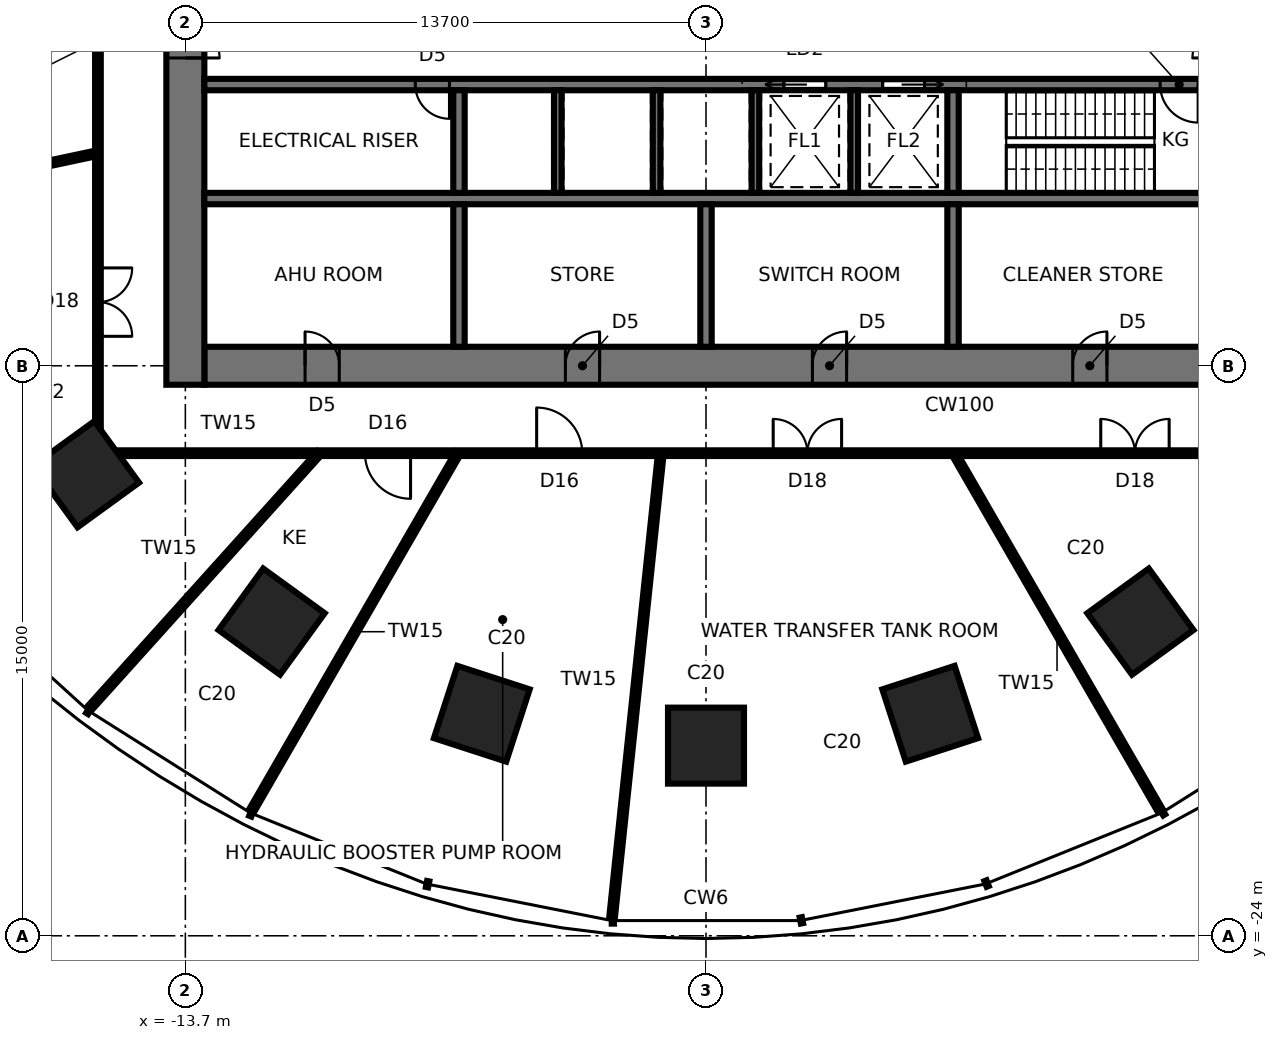
"""IFC4 building model, lengths in metres.
Left out: names, types, materials, properties, quantities, classifications, styles, units other than length and angle.
Written with IfcOpenShell. Run it as: python <this file> out.ifc"""

import sys

from ifc_helpers import new_model, si_unit, direction, frame, frame_2d, origin, origin_2d, place, context, subcontext, project, spatial, rectangle, extrude, element, fill, save


model = new_model("IFC4")
c1 = context("Model", 3, precision=1e-05, world=origin(), true_north=direction((0.0, 1.0)))
c2 = subcontext(c1, "Body", "Model", "MODEL_VIEW")
j1 = project(units=[si_unit("LENGTHUNIT", "METRE"), si_unit("PLANEANGLEUNIT", "RADIAN")], contexts=[c1])
p1 = place(None, origin())
s1 = spatial("IfcSite", under=j1, at=p1, CompositionType="ELEMENT")
p2 = place(p1, origin())
s2 = spatial("IfcBuilding", under=s1, at=p2, CompositionType="ELEMENT")
p3 = place(p2, frame((0.0, 0.0, 86.8)))
s3 = spatial("IfcBuildingStorey", under=s2, at=p3, CompositionType="ELEMENT", Elevation=86.8)
for number, where, z_axis, x_axis in (
    (1, (-16.315, -11.854, 0.0), (0.0, 0.0, 1.0), (-0.809, -0.588, 0.0)),
    (2, (-11.43, -15.733, 0.0), (0.0, 0.0, 1.0), (-0.588, -0.809, 0.0)),
    (3, (-5.9, -18.157, 0.0), (0.0, 0.0, 1.0), (-0.309, -0.951, 0.0)),
    (4, (0.0, -18.996, 0.0), (0.0, 0.0, 1.0), (0.0, -1.0, 0.0)),
    (5, (5.9, -18.157, 0.0), (0.0, 0.0, 1.0), (0.309, -0.951, 0.0)),
    (6, (11.43, -15.733, 0.0), (0.0, 0.0, 1.0), (0.588, -0.809, 0.0)),
):
    element("IfcColumn", number, at=place(p3, frame(where, z_axis=z_axis, x_axis=x_axis)), inside=s3, PredefinedType="COLUMN", context=c2, shape_type="SweptSolid", body=[
        extrude(rectangle(XDim=2.0, YDim=2.0, at=origin_2d()), origin(), (0.0, 0.0, 1.0), 5.6),
    ])
p4 = place(p3, frame((-13.2, -9.0, 0.0), z_axis=(0.0, 0.0, 1.0), x_axis=(1.0, 0.0, 0.0)))
e7 = element("IfcWall", 7, at=p4, inside=s3, PredefinedType="SHEAR", context=c2, shape_type="SweptSolid", body=[
    extrude(rectangle(XDim=26.4, YDim=1.0, at=frame_2d((13.2, 0.0))), origin(), (0.0, 0.0, 1.0), 5.6),
])
p5 = place(p4, frame((2.65, 0.0, 0.0)))
e8 = element("IfcOpeningElement", 8, at=p5, cuts=e7, PredefinedType="OPENING", context=c2, shape_type="SweptSolid", body=[
    extrude(rectangle(XDim=0.9, YDim=2.1, at=frame_2d((0.45, 1.05))), frame((0.0, 0.51, 0.0), z_axis=(0.0, -1.0, 0.0), x_axis=(1.0, 0.0, 0.0)), (0.0, 0.0, 1.0), 1.02),
])
p6 = place(p4, frame((9.5, 0.0, 0.0)))
e9 = element("IfcOpeningElement", 9, at=p6, cuts=e7, PredefinedType="OPENING", context=c2, shape_type="SweptSolid", body=[
    extrude(rectangle(XDim=0.9, YDim=2.1, at=frame_2d((0.45, 1.05))), frame((0.0, 0.51, 0.0), z_axis=(0.0, -1.0, 0.0), x_axis=(1.0, 0.0, 0.0)), (0.0, 0.0, 1.0), 1.02),
])
p7 = place(p4, frame((16.0, 0.0, 0.0)))
e10 = element("IfcOpeningElement", 10, at=p7, cuts=e7, PredefinedType="OPENING", context=c2, shape_type="SweptSolid", body=[
    extrude(rectangle(XDim=0.9, YDim=2.1, at=frame_2d((0.45, 1.05))), frame((0.0, 0.51, 0.0), z_axis=(0.0, -1.0, 0.0), x_axis=(1.0, 0.0, 0.0)), (0.0, 0.0, 1.0), 1.02),
])
p8 = place(p4, frame((22.85, 0.0, 0.0)))
e11 = element("IfcOpeningElement", 11, at=p8, cuts=e7, PredefinedType="OPENING", context=c2, shape_type="SweptSolid", body=[
    extrude(rectangle(XDim=0.9, YDim=2.1, at=frame_2d((0.45, 1.05))), frame((0.0, 0.51, 0.0), z_axis=(0.0, -1.0, 0.0), x_axis=(1.0, 0.0, 0.0)), (0.0, 0.0, 1.0), 1.02),
])
p9 = place(p3, frame((-13.7, 9.5, 0.0), z_axis=(0.0, 0.0, 1.0), x_axis=(0.0, -1.0, 0.0)))
e12 = element("IfcWall", 12, at=p9, inside=s3, PredefinedType="SHEAR", context=c2, shape_type="SweptSolid", body=[
    extrude(rectangle(XDim=19.0, YDim=1.0, at=frame_2d((9.5, 0.0))), origin(), (0.0, 0.0, 1.0), 5.6),
])
p10 = place(p9, frame((8.6, 0.0, 0.0)))
e13 = element("IfcOpeningElement", 13, at=p10, cuts=e12, PredefinedType="OPENING", context=c2, shape_type="SweptSolid", body=[
    extrude(rectangle(XDim=1.8, YDim=2.4, at=frame_2d((0.9, 1.2))), frame((0.0, 0.51, 0.0), z_axis=(0.0, -1.0, 0.0), x_axis=(1.0, 0.0, 0.0)), (0.0, 0.0, 1.0), 1.02),
])
p11 = place(p3, frame((-13.2, -1.6, 0.0), z_axis=(0.0, 0.0, 1.0), x_axis=(1.0, 0.0, 0.0)))
e14 = element("IfcWall", 14, at=p11, inside=s3, PredefinedType="SHEAR", context=c2, shape_type="SweptSolid", body=[
    extrude(rectangle(XDim=26.4, YDim=0.3, at=frame_2d((13.2, 0.0))), origin(), (0.0, 0.0, 1.0), 5.6),
])
p12 = place(p11, frame((25.15, 0.0, 0.0)))
e15 = element("IfcOpeningElement", 15, at=p12, cuts=e14, PredefinedType="OPENING", context=c2, shape_type="SweptSolid", body=[
    extrude(rectangle(XDim=1.0, YDim=2.1, at=frame_2d((0.5, 1.05))), frame((0.0, 0.16, 0.0), z_axis=(0.0, -1.0, 0.0), x_axis=(1.0, 0.0, 0.0)), (0.0, 0.0, 1.0), 0.32),
])
p13 = place(p11, frame((15.25, 0.0, 0.0)))
e16 = element("IfcOpeningElement", 16, at=p13, cuts=e14, PredefinedType="OPENING", context=c2, shape_type="SweptSolid", body=[
    extrude(rectangle(XDim=1.1, YDim=2.3, at=frame_2d((0.55, 1.15))), frame((0.0, 0.16, 0.0), z_axis=(0.0, -1.0, 0.0), x_axis=(1.0, 0.0, 0.0)), (0.0, 0.0, 1.0), 0.32),
])
p14 = place(p11, frame((17.85, 0.0, 0.0)))
e17 = element("IfcOpeningElement", 17, at=p14, cuts=e14, PredefinedType="OPENING", context=c2, shape_type="SweptSolid", body=[
    extrude(rectangle(XDim=1.1, YDim=2.3, at=frame_2d((0.55, 1.15))), frame((0.0, 0.16, 0.0), z_axis=(0.0, -1.0, 0.0), x_axis=(1.0, 0.0, 0.0)), (0.0, 0.0, 1.0), 0.32),
])
p15 = place(p11, frame((5.55, 0.0, 0.0)))
e18 = element("IfcOpeningElement", 18, at=p15, cuts=e14, PredefinedType="OPENING", context=c2, shape_type="SweptSolid", body=[
    extrude(rectangle(XDim=0.9, YDim=2.1, at=frame_2d((0.45, 1.05))), frame((0.0, 0.16, 0.0), z_axis=(0.0, -1.0, 0.0), x_axis=(1.0, 0.0, 0.0)), (0.0, 0.0, 1.0), 0.32),
])
p16 = place(p3, frame((-13.2, -4.6, 0.0), z_axis=(0.0, 0.0, 1.0), x_axis=(1.0, 0.0, 0.0)))
e19 = element("IfcWall", 19, at=p16, inside=s3, PredefinedType="SHEAR", context=c2, shape_type="SweptSolid", body=[
    extrude(rectangle(XDim=26.4, YDim=0.3, at=frame_2d((13.2, 0.0))), origin(), (0.0, 0.0, 1.0), 5.6),
])
p17 = place(p3, frame((-6.5, -1.75, 0.0), z_axis=(0.0, 0.0, 1.0), x_axis=(0.0, -1.0, 0.0)))
e20 = element("IfcWall", 20, at=p17, inside=s3, PredefinedType="SHEAR", context=c2, shape_type="SweptSolid", body=[
    extrude(rectangle(XDim=2.7, YDim=0.3, at=frame_2d((1.35, 0.0))), origin(), (0.0, 0.0, 1.0), 5.6),
])
p18 = place(p3, frame((-6.5, -4.75, 0.0), z_axis=(0.0, 0.0, 1.0), x_axis=(0.0, -1.0, 0.0)))
e21 = element("IfcWall", 21, at=p18, inside=s3, PredefinedType="SHEAR", context=c2, shape_type="SweptSolid", body=[
    extrude(rectangle(XDim=3.75, YDim=0.3, at=frame_2d((1.875, 0.0))), origin(), (0.0, 0.0, 1.0), 5.6),
])
p19 = place(p3, frame((6.5, -1.75, 0.0), z_axis=(0.0, 0.0, 1.0), x_axis=(0.0, -1.0, 0.0)))
e22 = element("IfcWall", 22, at=p19, inside=s3, PredefinedType="SHEAR", context=c2, shape_type="SweptSolid", body=[
    extrude(rectangle(XDim=2.7, YDim=0.3, at=frame_2d((1.35, 0.0))), origin(), (0.0, 0.0, 1.0), 5.6),
])
p20 = place(p3, frame((6.5, -4.75, 0.0), z_axis=(0.0, 0.0, 1.0), x_axis=(0.0, -1.0, 0.0)))
e23 = element("IfcWall", 23, at=p20, inside=s3, PredefinedType="SHEAR", context=c2, shape_type="SweptSolid", body=[
    extrude(rectangle(XDim=3.75, YDim=0.3, at=frame_2d((1.875, 0.0))), origin(), (0.0, 0.0, 1.0), 5.6),
])
for number, where, z_axis, x_axis in (
    (24, (-3.9, -1.75, 0.0), (0.0, 0.0, 1.0), (0.0, -1.0, 0.0)),
    (25, (-1.3, -1.75, 0.0), (0.0, 0.0, 1.0), (0.0, -1.0, 0.0)),
    (26, (1.3, -1.75, 0.0), (0.0, 0.0, 1.0), (0.0, -1.0, 0.0)),
    (27, (3.9, -1.75, 0.0), (0.0, 0.0, 1.0), (0.0, -1.0, 0.0)),
):
    element("IfcWall", number, at=place(p3, frame(where, z_axis=z_axis, x_axis=x_axis)), inside=s3, PredefinedType="SHEAR", context=c2, shape_type="SweptSolid", body=[
        extrude(rectangle(XDim=2.7, YDim=0.2, at=frame_2d((1.35, 0.0))), origin(), (0.0, 0.0, 1.0), 5.6),
    ])
p21 = place(p3, frame((0.0, -4.75, 0.0), z_axis=(0.0, 0.0, 1.0), x_axis=(0.0, -1.0, 0.0)))
e28 = element("IfcWall", 28, at=p21, inside=s3, PredefinedType="SHEAR", context=c2, shape_type="SweptSolid", body=[
    extrude(rectangle(XDim=3.75, YDim=0.3, at=frame_2d((1.875, 0.0))), origin(), (0.0, 0.0, 1.0), 5.6),
])
p22 = place(p3, frame((-16.0, -3.401, 0.0), z_axis=(0.0, 0.0, 1.0), x_axis=(-0.978145186273, -0.207923049637, 0.0)))
e29 = element("IfcWall", 29, at=p22, inside=s3, PredefinedType="PARTITIONING", context=c2, shape_type="SweptSolid", body=[
    extrude(rectangle(XDim=9.719, YDim=0.15, at=frame_2d((4.859, 0.0))), origin(), (0.0, 0.0, 1.0), 5.4),
])
p23 = place(p3, frame((-10.175, -11.3, 0.0), z_axis=(0.0, 0.0, 1.0), x_axis=(-0.669136564673, -0.743139460544, 0.0)))
e30 = element("IfcWall", 30, at=p23, inside=s3, PredefinedType="PARTITIONING", context=c2, shape_type="SweptSolid", body=[
    extrude(rectangle(XDim=9.026, YDim=0.15, at=frame_2d((4.513, 0.0))), origin(), (0.0, 0.0, 1.0), 5.4),
])
p24 = place(p3, frame((-6.524, -11.3, 0.0), z_axis=(0.0, 0.0, 1.0), x_axis=(-0.499989292232, -0.866031585829, 0.0)))
e31 = element("IfcWall", 31, at=p24, inside=s3, PredefinedType="PARTITIONING", context=c2, shape_type="SweptSolid", body=[
    extrude(rectangle(XDim=10.85, YDim=0.15, at=frame_2d((5.425, 0.0))), origin(), (0.0, 0.0, 1.0), 5.4),
])
p25 = place(p3, frame((-1.188, -11.3, 0.0), z_axis=(0.0, 0.0, 1.0), x_axis=(-0.104528610728, -0.99452187987, 0.0)))
e32 = element("IfcWall", 32, at=p25, inside=s3, PredefinedType="PARTITIONING", context=c2, shape_type="SweptSolid", body=[
    extrude(rectangle(XDim=12.288, YDim=0.15, at=frame_2d((6.144, 0.0))), origin(), (0.0, 0.0, 1.0), 5.4),
])
p26 = place(p3, frame((-16.0, -11.3, 0.0), z_axis=(0.0, 0.0, 1.0), x_axis=(1.0, 0.0, 0.0)))
e33 = element("IfcWall", 33, at=p26, inside=s3, PredefinedType="PARTITIONING", context=c2, shape_type="SweptSolid", body=[
    extrude(rectangle(XDim=32.0, YDim=0.15, at=frame_2d((16.0, 0.0))), origin(), (0.0, 0.0, 1.0), 5.4),
])
p27 = place(p26, frame((7.026, 0.0, 0.0)))
e34 = element("IfcOpeningElement", 34, at=p27, cuts=e33, PredefinedType="OPENING", context=c2, shape_type="SweptSolid", body=[
    extrude(rectangle(XDim=1.2, YDim=2.1, at=frame_2d((0.6, 1.05))), frame((0.0, 0.085, 0.0), z_axis=(0.0, -1.0, 0.0), x_axis=(1.0, 0.0, 0.0)), (0.0, 0.0, 1.0), 0.17),
])
p28 = place(p26, frame((11.544, 0.0, 0.0)))
e35 = element("IfcOpeningElement", 35, at=p28, cuts=e33, PredefinedType="OPENING", context=c2, shape_type="SweptSolid", body=[
    extrude(rectangle(XDim=1.2, YDim=2.1, at=frame_2d((0.6, 1.05))), frame((0.0, 0.085, 0.0), z_axis=(0.0, -1.0, 0.0), x_axis=(1.0, 0.0, 0.0)), (0.0, 0.0, 1.0), 0.17),
])
p29 = place(p26, frame((17.768, 0.0, 0.0)))
e36 = element("IfcOpeningElement", 36, at=p29, cuts=e33, PredefinedType="OPENING", context=c2, shape_type="SweptSolid", body=[
    extrude(rectangle(XDim=1.8, YDim=2.4, at=frame_2d((0.9, 1.2))), frame((0.0, 0.085, 0.0), z_axis=(0.0, -1.0, 0.0), x_axis=(1.0, 0.0, 0.0)), (0.0, 0.0, 1.0), 0.17),
])
p30 = place(p26, frame((26.387, 0.0, 0.0)))
e37 = element("IfcOpeningElement", 37, at=p30, cuts=e33, PredefinedType="OPENING", context=c2, shape_type="SweptSolid", body=[
    extrude(rectangle(XDim=1.8, YDim=2.4, at=frame_2d((0.9, 1.2))), frame((0.0, 0.085, 0.0), z_axis=(0.0, -1.0, 0.0), x_axis=(1.0, 0.0, 0.0)), (0.0, 0.0, 1.0), 0.17),
])
p31 = place(p3, frame((6.524, -11.3, 0.0), z_axis=(0.0, 0.0, 1.0), x_axis=(0.499989292232, -0.866031585829, 0.0)))
e38 = element("IfcWall", 38, at=p31, inside=s3, PredefinedType="PARTITIONING", context=c2, shape_type="SweptSolid", body=[
    extrude(rectangle(XDim=10.85, YDim=0.15, at=frame_2d((5.425, 0.0))), origin(), (0.0, 0.0, 1.0), 5.4),
])
p32 = place(p3, frame((-16.0, 11.3, 0.0), z_axis=(0.0, 0.0, 1.0), x_axis=(0.0, -1.0, 0.0)))
e39 = element("IfcWall", 39, at=p32, inside=s3, PredefinedType="PARTITIONING", context=c2, shape_type="SweptSolid", body=[
    extrude(rectangle(XDim=22.6, YDim=0.15, at=frame_2d((11.3, 0.0))), origin(), (0.0, 0.0, 1.0), 5.4),
])
p33 = place(p32, frame((8.539, 0.0, 0.0)))
e40 = element("IfcOpeningElement", 40, at=p33, cuts=e39, PredefinedType="OPENING", context=c2, shape_type="SweptSolid", body=[
    extrude(rectangle(XDim=1.8, YDim=2.4, at=frame_2d((0.9, 1.2))), frame((0.0, 0.085, 0.0), z_axis=(0.0, -1.0, 0.0), x_axis=(1.0, 0.0, 0.0)), (0.0, 0.0, 1.0), 0.17),
])
p34 = place(p32, frame((17.725, 0.0, 0.0)))
e41 = element("IfcOpeningElement", 41, at=p34, cuts=e39, PredefinedType="OPENING", context=c2, shape_type="SweptSolid", body=[
    extrude(rectangle(XDim=1.8, YDim=2.4, at=frame_2d((0.9, 1.2))), frame((0.0, 0.085, 0.0), z_axis=(0.0, -1.0, 0.0), x_axis=(1.0, 0.0, 0.0)), (0.0, 0.0, 1.0), 0.17),
])
p35 = place(p10, origin())
e42 = element("IfcDoor", 42, at=p35, inside=s3, OperationType="DOUBLE_DOOR_SINGLE_SWING", PredefinedType="DOOR", context=c2, shape_type="SweptSolid", body=[
    extrude(rectangle(XDim=1.72, YDim=2.36, at=frame_2d((0.9, 1.18))), frame((0.0, 0.025, 0.0), z_axis=(0.0, -1.0, 0.0), x_axis=(1.0, 0.0, 0.0)), (0.0, 0.0, 1.0), 0.05),
    extrude(rectangle(XDim=0.04, YDim=2.4, at=frame_2d((0.02, 1.2))), frame((0.0, 0.25, 0.0), z_axis=(0.0, -1.0, 0.0), x_axis=(1.0, 0.0, 0.0)), (0.0, 0.0, 1.0), 0.5),
    extrude(rectangle(XDim=0.04, YDim=2.4, at=frame_2d((1.78, 1.2))), frame((0.0, 0.25, 0.0), z_axis=(0.0, -1.0, 0.0), x_axis=(1.0, 0.0, 0.0)), (0.0, 0.0, 1.0), 0.5),
    extrude(rectangle(XDim=1.72, YDim=0.04, at=frame_2d((0.9, 2.38))), frame((0.0, 0.25, 0.0), z_axis=(0.0, -1.0, 0.0), x_axis=(1.0, 0.0, 0.0)), (0.0, 0.0, 1.0), 0.5),
])
fill(e13, e42)
p36 = place(p12, frame((1.0, 0.0, 0.0), z_axis=(0.0, 0.0, 1.0), x_axis=(-1.0, 0.0, 0.0)))
e43 = element("IfcDoor", 43, at=p36, inside=s3, OperationType="SINGLE_SWING_LEFT", PredefinedType="DOOR", context=c2, shape_type="SweptSolid", body=[
    extrude(rectangle(XDim=1.0, YDim=2.1, at=frame_2d((0.5, 1.05))), frame((0.0, 0.025, 0.0), z_axis=(0.0, -1.0, 0.0), x_axis=(1.0, 0.0, 0.0)), (0.0, 0.0, 1.0), 0.05),
])
fill(e15, e43)
p37 = place(p13, frame((1.1, 0.0, 0.0), z_axis=(0.0, 0.0, 1.0), x_axis=(-1.0, 0.0, 0.0)))
e44 = element("IfcDoor", 44, at=p37, inside=s3, OperationType="SLIDING_TO_RIGHT", PredefinedType="DOOR", context=c2, shape_type="SweptSolid", body=[
    extrude(rectangle(XDim=1.1, YDim=2.3, at=frame_2d((0.55, 1.15))), frame((0.0, 0.025, 0.0), z_axis=(0.0, -1.0, 0.0), x_axis=(1.0, 0.0, 0.0)), (0.0, 0.0, 1.0), 0.05),
])
fill(e16, e44)
p38 = place(p14, frame((1.1, 0.0, 0.0), z_axis=(0.0, 0.0, 1.0), x_axis=(-1.0, 0.0, 0.0)))
e45 = element("IfcDoor", 45, at=p38, inside=s3, OperationType="SLIDING_TO_LEFT", PredefinedType="DOOR", context=c2, shape_type="SweptSolid", body=[
    extrude(rectangle(XDim=1.1, YDim=2.3, at=frame_2d((0.55, 1.15))), frame((0.0, 0.025, 0.0), z_axis=(0.0, -1.0, 0.0), x_axis=(1.0, 0.0, 0.0)), (0.0, 0.0, 1.0), 0.05),
])
fill(e17, e45)
p39 = place(p15, frame((0.9, 0.0, 0.0), z_axis=(0.0, 0.0, 1.0), x_axis=(-1.0, 0.0, 0.0)))
e46 = element("IfcDoor", 46, at=p39, inside=s3, OperationType="SINGLE_SWING_LEFT", PredefinedType="DOOR", context=c2, shape_type="SweptSolid", body=[
    extrude(rectangle(XDim=0.9, YDim=2.1, at=frame_2d((0.45, 1.05))), frame((0.0, 0.025, 0.0), z_axis=(0.0, -1.0, 0.0), x_axis=(1.0, 0.0, 0.0)), (0.0, 0.0, 1.0), 0.05),
])
fill(e18, e46)
p40 = place(p5, origin())
e47 = element("IfcDoor", 47, at=p40, inside=s3, OperationType="SINGLE_SWING_LEFT", PredefinedType="DOOR", context=c2, shape_type="SweptSolid", body=[
    extrude(rectangle(XDim=0.82, YDim=2.06, at=frame_2d((0.45, 1.03))), frame((0.0, 0.025, 0.0), z_axis=(0.0, -1.0, 0.0), x_axis=(1.0, 0.0, 0.0)), (0.0, 0.0, 1.0), 0.05),
    extrude(rectangle(XDim=0.04, YDim=2.1, at=frame_2d((0.02, 1.05))), frame((0.0, 0.25, 0.0), z_axis=(0.0, -1.0, 0.0), x_axis=(1.0, 0.0, 0.0)), (0.0, 0.0, 1.0), 0.5),
    extrude(rectangle(XDim=0.04, YDim=2.1, at=frame_2d((0.88, 1.05))), frame((0.0, 0.25, 0.0), z_axis=(0.0, -1.0, 0.0), x_axis=(1.0, 0.0, 0.0)), (0.0, 0.0, 1.0), 0.5),
    extrude(rectangle(XDim=0.82, YDim=0.04, at=frame_2d((0.45, 2.08))), frame((0.0, 0.25, 0.0), z_axis=(0.0, -1.0, 0.0), x_axis=(1.0, 0.0, 0.0)), (0.0, 0.0, 1.0), 0.5),
])
fill(e8, e47)
p41 = place(p6, origin())
e48 = element("IfcDoor", 48, at=p41, inside=s3, OperationType="SINGLE_SWING_RIGHT", PredefinedType="DOOR", context=c2, shape_type="SweptSolid", body=[
    extrude(rectangle(XDim=0.82, YDim=2.06, at=frame_2d((0.45, 1.03))), frame((0.0, 0.025, 0.0), z_axis=(0.0, -1.0, 0.0), x_axis=(1.0, 0.0, 0.0)), (0.0, 0.0, 1.0), 0.05),
    extrude(rectangle(XDim=0.04, YDim=2.1, at=frame_2d((0.02, 1.05))), frame((0.0, 0.25, 0.0), z_axis=(0.0, -1.0, 0.0), x_axis=(1.0, 0.0, 0.0)), (0.0, 0.0, 1.0), 0.5),
    extrude(rectangle(XDim=0.04, YDim=2.1, at=frame_2d((0.88, 1.05))), frame((0.0, 0.25, 0.0), z_axis=(0.0, -1.0, 0.0), x_axis=(1.0, 0.0, 0.0)), (0.0, 0.0, 1.0), 0.5),
    extrude(rectangle(XDim=0.82, YDim=0.04, at=frame_2d((0.45, 2.08))), frame((0.0, 0.25, 0.0), z_axis=(0.0, -1.0, 0.0), x_axis=(1.0, 0.0, 0.0)), (0.0, 0.0, 1.0), 0.5),
])
fill(e9, e48)
p42 = place(p7, origin())
e49 = element("IfcDoor", 49, at=p42, inside=s3, OperationType="SINGLE_SWING_RIGHT", PredefinedType="DOOR", context=c2, shape_type="SweptSolid", body=[
    extrude(rectangle(XDim=0.82, YDim=2.06, at=frame_2d((0.45, 1.03))), frame((0.0, 0.025, 0.0), z_axis=(0.0, -1.0, 0.0), x_axis=(1.0, 0.0, 0.0)), (0.0, 0.0, 1.0), 0.05),
    extrude(rectangle(XDim=0.04, YDim=2.1, at=frame_2d((0.02, 1.05))), frame((0.0, 0.25, 0.0), z_axis=(0.0, -1.0, 0.0), x_axis=(1.0, 0.0, 0.0)), (0.0, 0.0, 1.0), 0.5),
    extrude(rectangle(XDim=0.04, YDim=2.1, at=frame_2d((0.88, 1.05))), frame((0.0, 0.25, 0.0), z_axis=(0.0, -1.0, 0.0), x_axis=(1.0, 0.0, 0.0)), (0.0, 0.0, 1.0), 0.5),
    extrude(rectangle(XDim=0.82, YDim=0.04, at=frame_2d((0.45, 2.08))), frame((0.0, 0.25, 0.0), z_axis=(0.0, -1.0, 0.0), x_axis=(1.0, 0.0, 0.0)), (0.0, 0.0, 1.0), 0.5),
])
fill(e10, e49)
p43 = place(p8, origin())
e50 = element("IfcDoor", 50, at=p43, inside=s3, OperationType="SINGLE_SWING_RIGHT", PredefinedType="DOOR", context=c2, shape_type="SweptSolid", body=[
    extrude(rectangle(XDim=0.82, YDim=2.06, at=frame_2d((0.45, 1.03))), frame((0.0, 0.025, 0.0), z_axis=(0.0, -1.0, 0.0), x_axis=(1.0, 0.0, 0.0)), (0.0, 0.0, 1.0), 0.05),
    extrude(rectangle(XDim=0.04, YDim=2.1, at=frame_2d((0.02, 1.05))), frame((0.0, 0.25, 0.0), z_axis=(0.0, -1.0, 0.0), x_axis=(1.0, 0.0, 0.0)), (0.0, 0.0, 1.0), 0.5),
    extrude(rectangle(XDim=0.04, YDim=2.1, at=frame_2d((0.88, 1.05))), frame((0.0, 0.25, 0.0), z_axis=(0.0, -1.0, 0.0), x_axis=(1.0, 0.0, 0.0)), (0.0, 0.0, 1.0), 0.5),
    extrude(rectangle(XDim=0.82, YDim=0.04, at=frame_2d((0.45, 2.08))), frame((0.0, 0.25, 0.0), z_axis=(0.0, -1.0, 0.0), x_axis=(1.0, 0.0, 0.0)), (0.0, 0.0, 1.0), 0.5),
])
fill(e11, e50)
p44 = place(p34, origin())
e51 = element("IfcDoor", 51, at=p44, inside=s3, OperationType="DOUBLE_DOOR_SINGLE_SWING", PredefinedType="DOOR", context=c2, shape_type="SweptSolid", body=[
    extrude(rectangle(XDim=1.8, YDim=2.4, at=frame_2d((0.9, 1.2))), frame((0.0, 0.025, 0.0), z_axis=(0.0, -1.0, 0.0), x_axis=(1.0, 0.0, 0.0)), (0.0, 0.0, 1.0), 0.05),
])
fill(e41, e51)
p45 = place(p27, frame((1.2, 0.0, 0.0), z_axis=(0.0, 0.0, 1.0), x_axis=(-1.0, 0.0, 0.0)))
e52 = element("IfcDoor", 52, at=p45, inside=s3, OperationType="SINGLE_SWING_LEFT", PredefinedType="DOOR", context=c2, shape_type="SweptSolid", body=[
    extrude(rectangle(XDim=1.2, YDim=2.1, at=frame_2d((0.6, 1.05))), frame((0.0, 0.025, 0.0), z_axis=(0.0, -1.0, 0.0), x_axis=(1.0, 0.0, 0.0)), (0.0, 0.0, 1.0), 0.05),
])
fill(e34, e52)
p46 = place(p28, origin())
e53 = element("IfcDoor", 53, at=p46, inside=s3, OperationType="SINGLE_SWING_LEFT", PredefinedType="DOOR", context=c2, shape_type="SweptSolid", body=[
    extrude(rectangle(XDim=1.2, YDim=2.1, at=frame_2d((0.6, 1.05))), frame((0.0, 0.025, 0.0), z_axis=(0.0, -1.0, 0.0), x_axis=(1.0, 0.0, 0.0)), (0.0, 0.0, 1.0), 0.05),
])
fill(e35, e53)
p47 = place(p29, origin())
e54 = element("IfcDoor", 54, at=p47, inside=s3, OperationType="DOUBLE_DOOR_SINGLE_SWING", PredefinedType="DOOR", context=c2, shape_type="SweptSolid", body=[
    extrude(rectangle(XDim=1.8, YDim=2.4, at=frame_2d((0.9, 1.2))), frame((0.0, 0.025, 0.0), z_axis=(0.0, -1.0, 0.0), x_axis=(1.0, 0.0, 0.0)), (0.0, 0.0, 1.0), 0.05),
])
fill(e36, e54)
p48 = place(p30, origin())
e55 = element("IfcDoor", 55, at=p48, inside=s3, OperationType="DOUBLE_DOOR_SINGLE_SWING", PredefinedType="DOOR", context=c2, shape_type="SweptSolid", body=[
    extrude(rectangle(XDim=1.8, YDim=2.4, at=frame_2d((0.9, 1.2))), frame((0.0, 0.025, 0.0), z_axis=(0.0, -1.0, 0.0), x_axis=(1.0, 0.0, 0.0)), (0.0, 0.0, 1.0), 0.05),
])
fill(e37, e55)
save(model, sys.argv[1])
